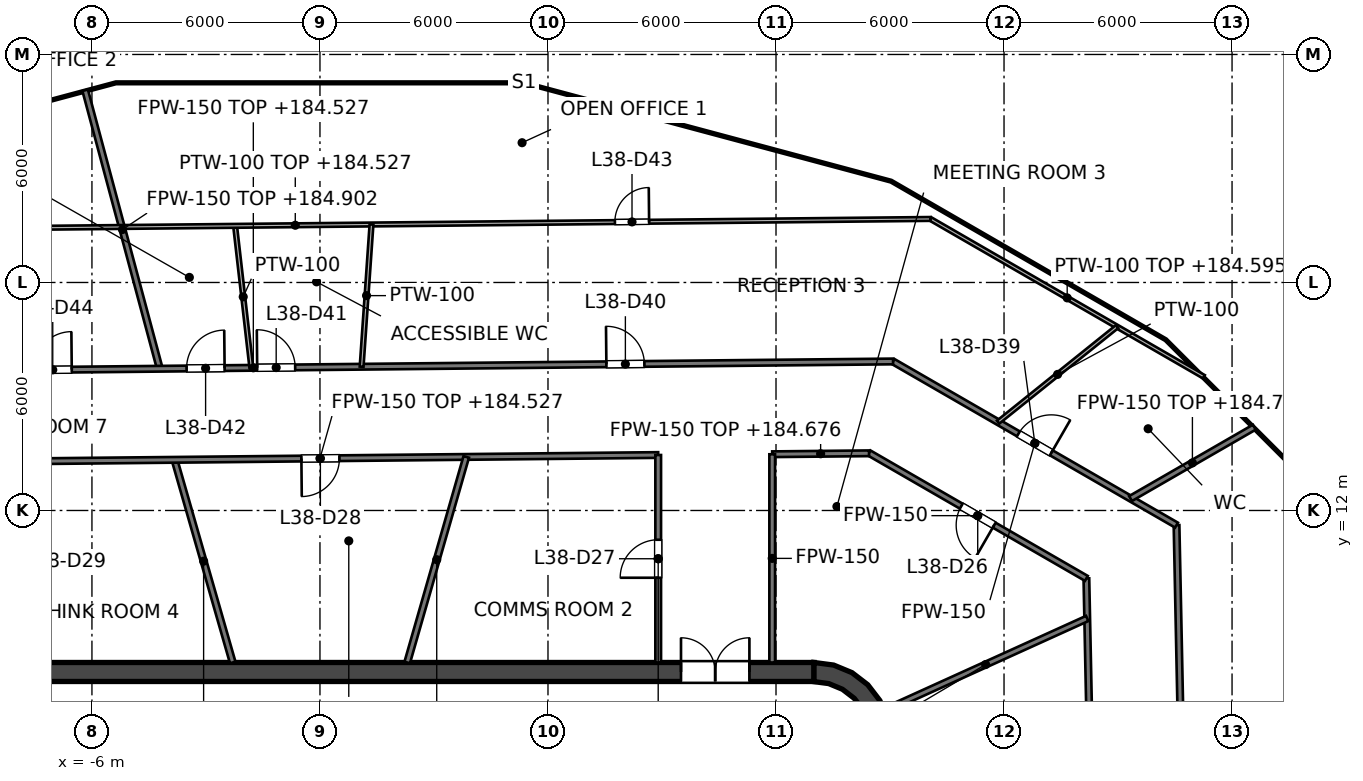
"""IFC4 building model, lengths in metres.
Left out: names, types, materials, properties, quantities, classifications, styles, units other than length and angle.
Written with IfcOpenShell. Run it as: python <this file> out.ifc"""

import sys

from ifc_helpers import new_model, si_unit, direction, frame, frame_2d, origin, place, context, subcontext, project, spatial, polyline, rectangle, outline, extrude, element, fill, save


model = new_model("IFC4")
c1 = context("Model", 3, precision=1e-05, world=origin(), true_north=direction((0.0, 1.0)))
c2 = subcontext(c1, "Body", "Model", "MODEL_VIEW")
j1 = project(units=[si_unit("LENGTHUNIT", "METRE"), si_unit("PLANEANGLEUNIT", "RADIAN")], contexts=[c1])
p1 = place(None, origin())
s1 = spatial("IfcSite", under=j1, at=p1, CompositionType="ELEMENT")
p2 = place(p1, origin())
s2 = spatial("IfcBuilding", under=s1, at=p2, CompositionType="ELEMENT")
p3 = place(p2, frame((0.0, 0.0, 181.6)))
s3 = spatial("IfcBuildingStorey", under=s2, at=p3, CompositionType="ELEMENT", Elevation=181.6)
p4 = place(p3, frame((-13.0, 7.75, 0.0), z_axis=(0.0, 0.0, 1.0), x_axis=(1.0, 0.0, 0.0)))
e1 = element("IfcWall", 1, at=p4, inside=s3, PredefinedType="SHEAR", context=c2, shape_type="SweptSolid", body=[
    extrude(rectangle(XDim=26.0, YDim=0.5, at=frame_2d((13.0, 0.0))), origin(), (0.0, 0.0, 1.0), 4.0),
])
p5 = place(p4, frame((1.7, 0.0, 0.0)))
e2 = element("IfcOpeningElement", 2, at=p5, cuts=e1, PredefinedType="OPENING", context=c2, shape_type="SweptSolid", body=[
    extrude(rectangle(XDim=1.8, YDim=2.1, at=frame_2d((0.9, 1.05))), frame((0.0, 0.25, 0.0), z_axis=(0.0, -1.0, 0.0), x_axis=(1.0, 0.0, 0.0)), (0.0, 0.0, 1.0), 0.5),
])
p6 = place(p4, frame((22.5, 0.0, 0.0)))
e3 = element("IfcOpeningElement", 3, at=p6, cuts=e1, PredefinedType="OPENING", context=c2, shape_type="SweptSolid", body=[
    extrude(rectangle(XDim=1.8, YDim=2.1, at=frame_2d((0.9, 1.05))), frame((0.0, 0.25, 0.0), z_axis=(0.0, -1.0, 0.0), x_axis=(1.0, 0.0, 0.0)), (0.0, 0.0, 1.0), 0.5),
])
p7 = place(p3, origin())
e4 = element("IfcWall", 4, at=p7, inside=s3, PredefinedType="SHEAR", context=c2, shape_type="SweptSolid", body=[
    extrude(outline(polyline([(13.0, 8.0), (13.0, 7.496), (13.387, 7.445), (13.748, 7.295), (14.058, 7.058), (14.295, 6.748), (14.445, 6.387), (14.496, 6.0), (15.0, 6.0), (14.932, 6.518), (14.732, 7.0), (14.414, 7.414), (14.0, 7.732), (13.518, 7.932), (13.0, 8.0)])), origin(), (0.0, 0.0, 1.0), 4.0),
])
p8 = place(p3, frame((-9.125, 7.05, 0.0), z_axis=(0.0, 0.0, 1.0), x_axis=(1.0, 0.0, 0.0)))
e5 = element("IfcWall", 5, at=p8, inside=s3, PredefinedType="SOLIDWALL", context=c2, shape_type="SweptSolid", body=[
    extrude(rectangle(XDim=18.25, YDim=0.9, at=frame_2d((9.125, 0.0))), origin(), (0.0, 0.0, 1.0), 3.85),
])
p9 = place(p3, frame((11.8, -7.5, 0.0), z_axis=(0.0, 0.0, 1.0), x_axis=(0.0, 1.0, 0.0)))
e6 = element("IfcWall", 6, at=p9, inside=s3, PredefinedType="SOLIDWALL", context=c2, shape_type="SweptSolid", body=[
    extrude(rectangle(XDim=15.0, YDim=0.4, at=frame_2d((7.5, 0.0))), origin(), (0.0, 0.0, 1.0), 3.85),
])
p10 = place(p9, frame((11.3, 0.0, 0.0)))
e7 = element("IfcOpeningElement", 7, at=p10, cuts=e6, PredefinedType="OPENING", context=c2, shape_type="SweptSolid", body=[
    extrude(rectangle(XDim=1.1, YDim=2.1, at=frame_2d((0.55, 1.05))), frame((0.0, 0.2, 0.0), z_axis=(0.0, -1.0, 0.0), x_axis=(1.0, 0.0, 0.0)), (0.0, 0.0, 1.0), 0.4),
])
p11 = place(p9, frame((8.4, 0.0, 0.0)))
e8 = element("IfcOpeningElement", 8, at=p11, cuts=e6, PredefinedType="OPENING", context=c2, shape_type="SweptSolid", body=[
    extrude(rectangle(XDim=1.1, YDim=2.1, at=frame_2d((0.55, 1.05))), frame((0.0, 0.2, 0.0), z_axis=(0.0, -1.0, 0.0), x_axis=(1.0, 0.0, 0.0)), (0.0, 0.0, 1.0), 0.4),
])
p12 = place(p9, frame((5.5, 0.0, 0.0)))
e9 = element("IfcOpeningElement", 9, at=p12, cuts=e6, PredefinedType="OPENING", context=c2, shape_type="SweptSolid", body=[
    extrude(rectangle(XDim=1.1, YDim=2.1, at=frame_2d((0.55, 1.05))), frame((0.0, 0.2, 0.0), z_axis=(0.0, -1.0, 0.0), x_axis=(1.0, 0.0, 0.0)), (0.0, 0.0, 1.0), 0.4),
])
p13 = place(p9, frame((13.697, 0.0, 0.0)))
e10 = element("IfcOpeningElement", 10, at=p13, cuts=e6, PredefinedType="OPENING", context=c2, shape_type="SweptSolid", body=[
    extrude(rectangle(XDim=0.9, YDim=2.1, at=frame_2d((0.45, 1.05))), frame((0.0, 0.2, 0.0), z_axis=(0.0, -1.0, 0.0), x_axis=(1.0, 0.0, 0.0)), (0.0, 0.0, 1.0), 0.4),
])
p14 = place(p9, frame((0.403, 0.0, 0.0)))
e11 = element("IfcOpeningElement", 11, at=p14, cuts=e6, PredefinedType="OPENING", context=c2, shape_type="SweptSolid", body=[
    extrude(rectangle(XDim=0.9, YDim=2.1, at=frame_2d((0.45, 1.05))), frame((0.0, 0.2, 0.0), z_axis=(0.0, -1.0, 0.0), x_axis=(1.0, 0.0, 0.0)), (0.0, 0.0, 1.0), 0.4),
])
p15 = place(p3, frame((20.167, 10.213, 0.0), z_axis=(0.0, 0.0, 1.0), x_axis=(0.020610894613, -0.999787572949, 0.0)))
e12 = element("IfcWall", 12, at=p15, inside=s3, PredefinedType="PARTITIONING", context=c2, shape_type="SweptSolid", body=[
    extrude(rectangle(XDim=17.637, YDim=0.15, at=frame_2d((8.819, 0.0))), origin(), (0.0, 0.0, 1.0), 2.927),
])
p16 = place(p15, frame((10.508, 0.0, 0.0)))
e13 = element("IfcOpeningElement", 13, at=p16, cuts=e12, PredefinedType="OPENING", context=c2, shape_type="SweptSolid", body=[
    extrude(rectangle(XDim=1.0, YDim=2.1, at=frame_2d((0.5, 1.05))), frame((0.0, 0.075, 0.0), z_axis=(0.0, -1.0, 0.0), x_axis=(1.0, 0.0, 0.0)), (0.0, 0.0, 1.0), 0.15),
])
p17 = place(p15, frame((5.09, 0.0, 0.0)))
e14 = element("IfcOpeningElement", 14, at=p17, cuts=e12, PredefinedType="OPENING", context=c2, shape_type="SweptSolid", body=[
    extrude(rectangle(XDim=1.0, YDim=2.1, at=frame_2d((0.5, 1.05))), frame((0.0, 0.075, 0.0), z_axis=(0.0, -1.0, 0.0), x_axis=(1.0, 0.0, 0.0)), (0.0, 0.0, 1.0), 0.15),
])
p18 = place(p3, frame((22.539, 11.615, 0.0), z_axis=(0.0, 0.0, 1.0), x_axis=(0.020613919434, -0.999787510587, 0.0)))
e15 = element("IfcWall", 15, at=p18, inside=s3, PredefinedType="PARTITIONING", context=c2, shape_type="SweptSolid", body=[
    extrude(rectangle(XDim=19.66, YDim=0.15, at=frame_2d((9.83, 0.0))), origin(), (0.0, 0.0, 1.0), 2.927),
])
p19 = place(p18, frame((9.33, 0.0, 0.0)))
e16 = element("IfcOpeningElement", 16, at=p19, cuts=e15, PredefinedType="OPENING", context=c2, shape_type="SweptSolid", body=[
    extrude(rectangle(XDim=1.0, YDim=2.1, at=frame_2d((0.5, 1.05))), frame((0.0, 0.075, 0.0), z_axis=(0.0, -1.0, 0.0), x_axis=(1.0, 0.0, 0.0)), (0.0, 0.0, 1.0), 0.15),
])
p20 = place(p3, frame((-6.178, 23.058, 0.0), z_axis=(0.0, 0.0, 1.0), x_axis=(0.258856186269, -0.965915873578, 0.0)))
e17 = element("IfcWall", 17, at=p20, inside=s3, PredefinedType="PARTITIONING", context=c2, shape_type="SweptSolid", body=[
    extrude(rectangle(XDim=7.587, YDim=0.15, at=frame_2d((3.793, 0.0))), origin(), (0.0, 0.0, 1.0), 3.302),
])
p21 = place(p3, frame((-3.827, 13.333, 0.0), z_axis=(0.0, 0.0, 1.0), x_axis=(0.275935525478, -0.961176147113, 0.0)))
e18 = element("IfcWall", 18, at=p21, inside=s3, PredefinedType="PARTITIONING", context=c2, shape_type="SweptSolid", body=[
    extrude(rectangle(XDim=5.548, YDim=0.15, at=frame_2d((2.774, 0.0))), origin(), (0.0, 0.0, 1.0), 3.85),
])
p22 = place(p3, frame((14.448, 13.515, 0.0), z_axis=(0.0, 0.0, 1.0), x_axis=(0.866016279763, -0.500015802937, 0.0)))
e19 = element("IfcWall", 19, at=p22, inside=s3, PredefinedType="PARTITIONING", context=c2, shape_type="SweptSolid", body=[
    extrude(rectangle(XDim=6.604, YDim=0.15, at=frame_2d((3.302, 0.0))), origin(), (0.0, 0.0, 1.0), 2.995),
])
p23 = place(p22, frame((2.802, 0.0, 0.0)))
e20 = element("IfcOpeningElement", 20, at=p23, cuts=e19, PredefinedType="OPENING", context=c2, shape_type="SweptSolid", body=[
    extrude(rectangle(XDim=1.0, YDim=2.1, at=frame_2d((0.5, 1.05))), frame((0.0, 0.075, 0.0), z_axis=(0.0, -1.0, 0.0), x_axis=(1.0, 0.0, 0.0)), (0.0, 0.0, 1.0), 0.15),
])
p24 = place(p3, frame((15.08, 15.921, 0.0), z_axis=(0.0, 0.0, 1.0), x_axis=(0.866020838546, -0.500007907142, 0.0)))
e21 = element("IfcWall", 21, at=p24, inside=s3, PredefinedType="PARTITIONING", context=c2, shape_type="SweptSolid", body=[
    extrude(rectangle(XDim=8.613, YDim=0.15, at=frame_2d((4.306, 0.0))), origin(), (0.0, 0.0, 1.0), 2.995),
])
p25 = place(p24, frame((3.808, 0.0, 0.0)))
e22 = element("IfcOpeningElement", 22, at=p25, cuts=e21, PredefinedType="OPENING", context=c2, shape_type="SweptSolid", body=[
    extrude(rectangle(XDim=1.0, YDim=2.1, at=frame_2d((0.5, 1.05))), frame((0.0, 0.075, 0.0), z_axis=(0.0, -1.0, 0.0), x_axis=(1.0, 0.0, 0.0)), (0.0, 0.0, 1.0), 0.15),
])
p26 = place(p3, frame((-8.9, 13.282, 0.0), z_axis=(0.0, 0.0, 1.0), x_axis=(0.99995056171, 0.009943547447, 0.0)))
e23 = element("IfcWall", 23, at=p26, inside=s3, PredefinedType="PARTITIONING", context=c2, shape_type="SweptSolid", body=[
    extrude(rectangle(XDim=17.801, YDim=0.15, at=frame_2d((8.9, 0.0))), origin(), (0.0, 0.0, 1.0), 2.927),
])
p27 = place(p26, frame((8.412, 0.0, 0.0)))
e24 = element("IfcOpeningElement", 24, at=p27, cuts=e23, PredefinedType="OPENING", context=c2, shape_type="SweptSolid", body=[
    extrude(rectangle(XDim=1.0, YDim=2.1, at=frame_2d((0.5, 1.05))), frame((0.0, 0.075, 0.0), z_axis=(0.0, -1.0, 0.0), x_axis=(1.0, 0.0, 0.0)), (0.0, 0.0, 1.0), 0.15),
])
p28 = place(p3, frame((11.9, 13.48, 0.0), z_axis=(0.0, 0.0, 1.0), x_axis=(0.999950357576, 0.009964054536, 0.0)))
e25 = element("IfcWall", 25, at=p28, inside=s3, PredefinedType="PARTITIONING", context=c2, shape_type="SweptSolid", body=[
    extrude(rectangle(XDim=2.548, YDim=0.15, at=frame_2d((1.274, 0.0))), origin(), (0.0, 0.0, 1.0), 3.076),
])
p29 = place(p3, frame((-18.587, 15.587, 0.0), z_axis=(0.0, 0.0, 1.0), x_axis=(0.99995051, 0.009948746191, 0.0)))
e26 = element("IfcWall", 26, at=p29, inside=s3, PredefinedType="PARTITIONING", context=c2, shape_type="SweptSolid", body=[
    extrude(rectangle(XDim=33.669, YDim=0.15, at=frame_2d((16.834, 0.0))), origin(), (0.0, 0.0, 1.0), 2.927),
])
p30 = place(p29, frame((26.125, 0.0, 0.0)))
e27 = element("IfcOpeningElement", 27, at=p30, cuts=e26, PredefinedType="OPENING", context=c2, shape_type="SweptSolid", body=[
    extrude(rectangle(XDim=1.0, YDim=2.1, at=frame_2d((0.5, 1.05))), frame((0.0, 0.075, 0.0), z_axis=(0.0, -1.0, 0.0), x_axis=(1.0, 0.0, 0.0)), (0.0, 0.0, 1.0), 0.15),
])
p31 = place(p29, frame((16.936, 0.0, 0.0)))
e28 = element("IfcOpeningElement", 28, at=p31, cuts=e26, PredefinedType="OPENING", context=c2, shape_type="SweptSolid", body=[
    extrude(rectangle(XDim=1.0, YDim=2.1, at=frame_2d((0.5, 1.05))), frame((0.0, 0.075, 0.0), z_axis=(0.0, -1.0, 0.0), x_axis=(1.0, 0.0, 0.0)), (0.0, 0.0, 1.0), 0.15),
])
p32 = place(p29, frame((15.079, 0.0, 0.0)))
e29 = element("IfcOpeningElement", 29, at=p32, cuts=e26, PredefinedType="OPENING", context=c2, shape_type="SweptSolid", body=[
    extrude(rectangle(XDim=1.0, YDim=2.1, at=frame_2d((0.5, 1.05))), frame((0.0, 0.075, 0.0), z_axis=(0.0, -1.0, 0.0), x_axis=(1.0, 0.0, 0.0)), (0.0, 0.0, 1.0), 0.15),
])
p33 = place(p29, frame((11.056, 0.0, 0.0)))
e30 = element("IfcOpeningElement", 30, at=p33, cuts=e26, PredefinedType="OPENING", context=c2, shape_type="SweptSolid", body=[
    extrude(rectangle(XDim=1.0, YDim=2.1, at=frame_2d((0.5, 1.05))), frame((0.0, 0.075, 0.0), z_axis=(0.0, -1.0, 0.0), x_axis=(1.0, 0.0, 0.0)), (0.0, 0.0, 1.0), 0.15),
])
p34 = place(p29, frame((4.104, 0.0, 0.0)))
e31 = element("IfcOpeningElement", 31, at=p34, cuts=e26, PredefinedType="OPENING", context=c2, shape_type="SweptSolid", body=[
    extrude(rectangle(XDim=1.0, YDim=2.1, at=frame_2d((0.5, 1.05))), frame((0.0, 0.075, 0.0), z_axis=(0.0, -1.0, 0.0), x_axis=(1.0, 0.0, 0.0)), (0.0, 0.0, 1.0), 0.15),
])
p35 = place(p3, frame((14.843, 6.733, 0.0), z_axis=(0.0, 0.0, 1.0), x_axis=(0.910628361306, 0.413226315214, 0.0)))
e32 = element("IfcWall", 32, at=p35, inside=s3, PredefinedType="PARTITIONING", context=c2, shape_type="SweptSolid", body=[
    extrude(rectangle(XDim=5.87, YDim=0.15, at=frame_2d((2.935, 0.0))), origin(), (0.0, 0.0, 1.0), 3.85),
])
p36 = place(p3, frame((21.329, 12.314, 0.0), z_axis=(0.0, 0.0, 1.0), x_axis=(0.866293710665, 0.499534990628, 0.0)))
e33 = element("IfcWall", 33, at=p36, inside=s3, PredefinedType="PARTITIONING", context=c2, shape_type="SweptSolid", body=[
    extrude(rectangle(XDim=3.758, YDim=0.15, at=frame_2d((1.879, 0.0))), origin(), (0.0, 0.0, 1.0), 3.152),
])
p37 = place(p3, frame((2.296, 8.0, 0.0), z_axis=(0.0, 0.0, 1.0), x_axis=(0.275958345059, 0.961169595749, 0.0)))
e34 = element("IfcWall", 34, at=p37, inside=s3, PredefinedType="PARTITIONING", context=c2, shape_type="SweptSolid", body=[
    extrude(rectangle(XDim=5.628, YDim=0.15, at=frame_2d((2.814, 0.0))), origin(), (0.0, 0.0, 1.0), 3.85),
])
p38 = place(p3, frame((11.9, 8.0, 0.0), z_axis=(0.0, 0.0, 1.0), x_axis=(0.0, 1.0, 0.0)))
e35 = element("IfcWall", 35, at=p38, inside=s3, PredefinedType="PARTITIONING", context=c2, shape_type="SweptSolid", body=[
    extrude(rectangle(XDim=5.479, YDim=0.15, at=frame_2d((2.74, 0.0))), origin(), (0.0, 0.0, 1.0), 2.995),
])
p39 = place(p3, frame((8.9, 8.0, 0.0), z_axis=(0.0, 0.0, 1.0), x_axis=(0.0, 1.0, 0.0)))
e36 = element("IfcWall", 36, at=p39, inside=s3, PredefinedType="PARTITIONING", context=c2, shape_type="SweptSolid", body=[
    extrude(rectangle(XDim=5.46, YDim=0.15, at=frame_2d((2.73, 0.0))), origin(), (0.0, 0.0, 1.0), 2.927),
])
p40 = place(p39, frame((2.23, 0.0, 0.0)))
e37 = element("IfcOpeningElement", 37, at=p40, cuts=e36, PredefinedType="OPENING", context=c2, shape_type="SweptSolid", body=[
    extrude(rectangle(XDim=1.0, YDim=2.1, at=frame_2d((0.5, 1.05))), frame((0.0, 0.075, 0.0), z_axis=(0.0, -1.0, 0.0), x_axis=(1.0, 0.0, 0.0)), (0.0, 0.0, 1.0), 0.15),
])
p41 = place(p3, frame((-2.233, 19.49, 0.0), z_axis=(0.0, 0.0, 1.0), x_axis=(0.113808420458, -0.993502714356, 0.0)))
e38 = element("IfcWall", 38, at=p41, inside=s3, PredefinedType="PARTITIONING", context=c2, shape_type="SweptSolid", body=[
    extrude(rectangle(XDim=3.76, YDim=0.1, at=frame_2d((1.88, 0.0))), origin(), (0.0, 0.0, 1.0), 3.85),
])
p42 = place(p3, frame((16.065, 19.671, 0.0), z_axis=(0.0, 0.0, 1.0), x_axis=(0.866060786485, -0.499938710357, 0.0)))
e39 = element("IfcWall", 39, at=p42, inside=s3, PredefinedType="PARTITIONING", context=c2, shape_type="SweptSolid", body=[
    extrude(rectangle(XDim=8.307, YDim=0.1, at=frame_2d((4.153, 0.0))), origin(), (0.0, 0.0, 1.0), 2.995),
])
p43 = place(p3, frame((-17.364, 19.34, 0.0), z_axis=(0.0, 0.0, 1.0), x_axis=(0.99995067692, 0.00993195487, 0.0)))
e40 = element("IfcWall", 40, at=p43, inside=s3, PredefinedType="PARTITIONING", context=c2, shape_type="SweptSolid", body=[
    extrude(rectangle(XDim=33.431, YDim=0.1, at=frame_2d((16.715, 0.0))), origin(), (0.0, 0.0, 1.0), 2.927),
])
p44 = place(p43, frame((25.126, 0.0, 0.0)))
e41 = element("IfcOpeningElement", 41, at=p44, cuts=e40, PredefinedType="OPENING", context=c2, shape_type="SweptSolid", body=[
    extrude(rectangle(XDim=0.9, YDim=2.1, at=frame_2d((0.45, 1.05))), frame((0.0, 0.05, 0.0), z_axis=(0.0, -1.0, 0.0), x_axis=(1.0, 0.0, 0.0)), (0.0, 0.0, 1.0), 0.1),
])
p45 = place(p43, frame((5.725, 0.0, 0.0)))
e42 = element("IfcOpeningElement", 42, at=p45, cuts=e40, PredefinedType="OPENING", context=c2, shape_type="SweptSolid", body=[
    extrude(rectangle(XDim=0.9, YDim=2.1, at=frame_2d((0.45, 1.05))), frame((0.0, 0.05, 0.0), z_axis=(0.0, -1.0, 0.0), x_axis=(1.0, 0.0, 0.0)), (0.0, 0.0, 1.0), 0.1),
])
p46 = place(p3, frame((17.845, 14.325, 0.0), z_axis=(0.0, 0.0, 1.0), x_axis=(0.779817060652, 0.626007469537, 0.0)))
e43 = element("IfcWall", 43, at=p46, inside=s3, PredefinedType="PARTITIONING", context=c2, shape_type="SweptSolid", body=[
    extrude(rectangle(XDim=4.013, YDim=0.1, at=frame_2d((2.006, 0.0))), origin(), (0.0, 0.0, 1.0), 3.85),
])
p47 = place(p3, frame((1.096, 15.783, 0.0), z_axis=(0.0, 0.0, 1.0), x_axis=(0.06931808301, 0.99759460873, 0.0)))
e44 = element("IfcWall", 44, at=p47, inside=s3, PredefinedType="PARTITIONING", context=c2, shape_type="SweptSolid", body=[
    extrude(rectangle(XDim=3.751, YDim=0.1, at=frame_2d((1.875, 0.0))), origin(), (0.0, 0.0, 1.0), 3.85),
])
p48 = place(p13, origin())
e45 = element("IfcDoor", 45, at=p48, inside=s3, OperationType="SINGLE_SWING_RIGHT", PredefinedType="DOOR", context=c2, shape_type="SweptSolid", body=[
    extrude(rectangle(XDim=0.9, YDim=2.1, at=frame_2d((0.45, 1.05))), frame((0.0, 0.025, 0.0), z_axis=(0.0, -1.0, 0.0), x_axis=(1.0, 0.0, 0.0)), (0.0, 0.0, 1.0), 0.05),
])
fill(e10, e45)
p49 = place(p6, origin())
e46 = element("IfcDoor", 46, at=p49, inside=s3, OperationType="DOUBLE_DOOR_SINGLE_SWING", PredefinedType="DOOR", context=c2, shape_type="SweptSolid", body=[
    extrude(rectangle(XDim=1.8, YDim=2.1, at=frame_2d((0.9, 1.05))), frame((0.0, 0.025, 0.0), z_axis=(0.0, -1.0, 0.0), x_axis=(1.0, 0.0, 0.0)), (0.0, 0.0, 1.0), 0.05),
])
fill(e3, e46)
p50 = place(p23, origin())
e47 = element("IfcDoor", 47, at=p50, inside=s3, OperationType="SINGLE_SWING_RIGHT", PredefinedType="DOOR", context=c2, shape_type="SweptSolid", body=[
    extrude(rectangle(XDim=1.0, YDim=2.1, at=frame_2d((0.5, 1.05))), frame((0.0, 0.025, 0.0), z_axis=(0.0, -1.0, 0.0), x_axis=(1.0, 0.0, 0.0)), (0.0, 0.0, 1.0), 0.05),
])
fill(e20, e47)
p51 = place(p40, origin())
e48 = element("IfcDoor", 48, at=p51, inside=s3, OperationType="SINGLE_SWING_LEFT", PredefinedType="DOOR", context=c2, shape_type="SweptSolid", body=[
    extrude(rectangle(XDim=1.0, YDim=2.1, at=frame_2d((0.5, 1.05))), frame((0.0, 0.025, 0.0), z_axis=(0.0, -1.0, 0.0), x_axis=(1.0, 0.0, 0.0)), (0.0, 0.0, 1.0), 0.05),
])
fill(e37, e48)
p52 = place(p27, origin())
e49 = element("IfcDoor", 49, at=p52, inside=s3, OperationType="SINGLE_SWING_LEFT", PredefinedType="DOOR", context=c2, shape_type="SweptSolid", body=[
    extrude(rectangle(XDim=1.0, YDim=2.1, at=frame_2d((0.5, 1.05))), frame((0.0, 0.025, 0.0), z_axis=(0.0, -1.0, 0.0), x_axis=(1.0, 0.0, 0.0)), (0.0, 0.0, 1.0), 0.05),
])
fill(e24, e49)
p53 = place(p25, origin())
e50 = element("IfcDoor", 50, at=p53, inside=s3, OperationType="SINGLE_SWING_RIGHT", PredefinedType="DOOR", context=c2, shape_type="SweptSolid", body=[
    extrude(rectangle(XDim=1.0, YDim=2.1, at=frame_2d((0.5, 1.05))), frame((0.0, 0.025, 0.0), z_axis=(0.0, -1.0, 0.0), x_axis=(1.0, 0.0, 0.0)), (0.0, 0.0, 1.0), 0.05),
])
fill(e22, e50)
p54 = place(p30, origin())
e51 = element("IfcDoor", 51, at=p54, inside=s3, OperationType="SINGLE_SWING_LEFT", PredefinedType="DOOR", context=c2, shape_type="SweptSolid", body=[
    extrude(rectangle(XDim=1.0, YDim=2.1, at=frame_2d((0.5, 1.05))), frame((0.0, 0.025, 0.0), z_axis=(0.0, -1.0, 0.0), x_axis=(1.0, 0.0, 0.0)), (0.0, 0.0, 1.0), 0.05),
])
fill(e27, e51)
p55 = place(p31, origin())
e52 = element("IfcDoor", 52, at=p55, inside=s3, OperationType="SINGLE_SWING_LEFT", PredefinedType="DOOR", context=c2, shape_type="SweptSolid", body=[
    extrude(rectangle(XDim=1.0, YDim=2.1, at=frame_2d((0.5, 1.05))), frame((0.0, 0.025, 0.0), z_axis=(0.0, -1.0, 0.0), x_axis=(1.0, 0.0, 0.0)), (0.0, 0.0, 1.0), 0.05),
])
fill(e28, e52)
p56 = place(p32, origin())
e53 = element("IfcDoor", 53, at=p56, inside=s3, OperationType="SINGLE_SWING_RIGHT", PredefinedType="DOOR", context=c2, shape_type="SweptSolid", body=[
    extrude(rectangle(XDim=1.0, YDim=2.1, at=frame_2d((0.5, 1.05))), frame((0.0, 0.025, 0.0), z_axis=(0.0, -1.0, 0.0), x_axis=(1.0, 0.0, 0.0)), (0.0, 0.0, 1.0), 0.05),
])
fill(e29, e53)
p57 = place(p44, origin())
e54 = element("IfcDoor", 54, at=p57, inside=s3, OperationType="SINGLE_SWING_RIGHT", PredefinedType="DOOR", context=c2, shape_type="SweptSolid", body=[
    extrude(rectangle(XDim=0.9, YDim=2.1, at=frame_2d((0.45, 1.05))), frame((0.0, 0.025, 0.0), z_axis=(0.0, -1.0, 0.0), x_axis=(1.0, 0.0, 0.0)), (0.0, 0.0, 1.0), 0.05),
])
fill(e41, e54)
p58 = place(p33, origin())
e55 = element("IfcDoor", 55, at=p58, inside=s3, OperationType="SINGLE_SWING_RIGHT", PredefinedType="DOOR", context=c2, shape_type="SweptSolid", body=[
    extrude(rectangle(XDim=1.0, YDim=2.1, at=frame_2d((0.5, 1.05))), frame((0.0, 0.025, 0.0), z_axis=(0.0, -1.0, 0.0), x_axis=(1.0, 0.0, 0.0)), (0.0, 0.0, 1.0), 0.05),
])
fill(e30, e55)
save(model, sys.argv[1])
